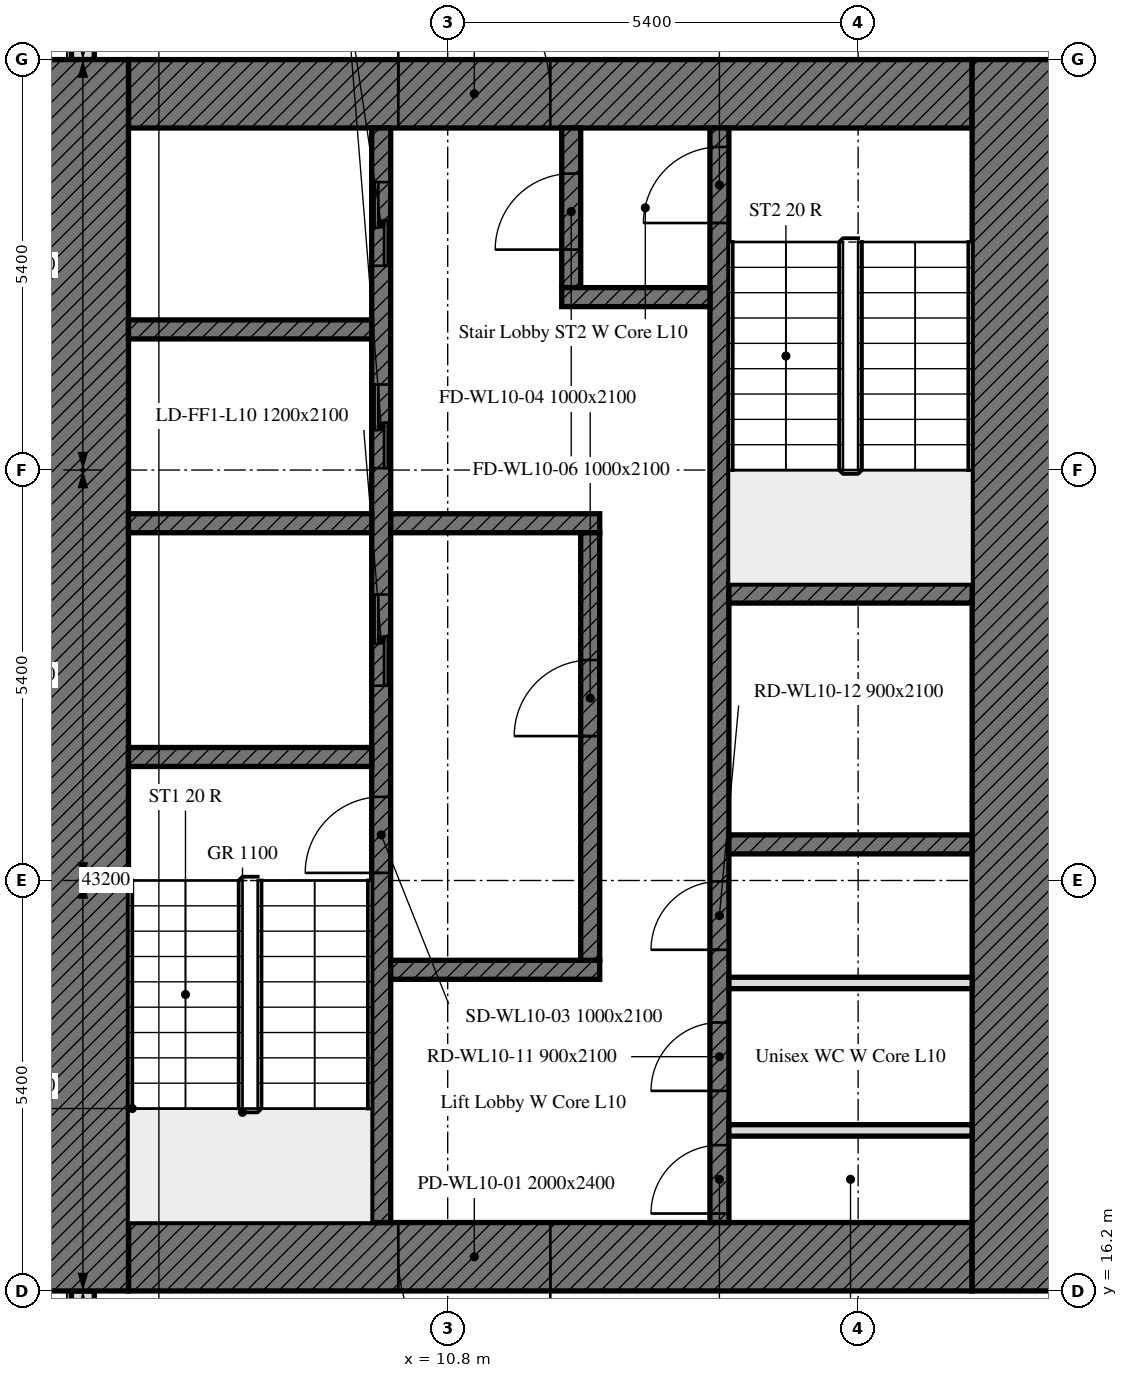
"""IFC4 building model, lengths in metres.
Left out: names, types, materials, properties, quantities, classifications, styles, units other than length and angle.
Written with IfcOpenShell. Run it as: python <this file> out.ifc"""

import sys

from ifc_helpers import new_model, si_unit, direction, frame, frame_2d, origin, place, context, subcontext, project, spatial, rectangle, extrude, element, fill, save


model = new_model("IFC4")
c1 = context("Model", 3, precision=1e-05, world=origin(), true_north=direction((0.0, 1.0)))
c2 = subcontext(c1, "Body", "Model", "MODEL_VIEW")
j1 = project(units=[si_unit("LENGTHUNIT", "METRE"), si_unit("PLANEANGLEUNIT", "RADIAN")], contexts=[c1])
p1 = place(None, origin())
s1 = spatial("IfcSite", under=j1, at=p1, CompositionType="ELEMENT")
p2 = place(p1, origin())
s2 = spatial("IfcBuilding", under=s1, at=p2, CompositionType="ELEMENT")
p3 = place(p2, frame((0.0, 0.0, 48.8)))
s3 = spatial("IfcBuildingStorey", under=s2, at=p3, CompositionType="ELEMENT", Elevation=48.8)
p4 = place(p3, frame((6.0, 37.614, 0.0), z_axis=(0.0, 0.0, 1.0), x_axis=(0.0, -1.0, 0.0)))
e1 = element("IfcWall", 1, at=p4, inside=s3, PredefinedType="SOLIDWALL", context=c2, shape_type="SweptSolid", body=[
    extrude(rectangle(XDim=5.214, YDim=0.3, at=frame_2d((2.607, 0.0))), origin(), (0.0, 0.0, 1.0), 3.5),
])
p5 = place(p4, frame((1.164, 0.0, 0.9)))
e2 = element("IfcOpeningElement", 2, at=p5, cuts=e1, PredefinedType="OPENING", context=c2, shape_type="SweptSolid", body=[
    extrude(rectangle(XDim=1.1, YDim=1.7, at=frame_2d((0.55, 0.85))), frame((0.0, 0.16, 0.0), z_axis=(0.0, -1.0, 0.0), x_axis=(1.0, 0.0, 0.0)), (0.0, 0.0, 1.0), 0.32),
])
p6 = place(p4, frame((2.764, 0.0, 0.9)))
e3 = element("IfcOpeningElement", 3, at=p6, cuts=e1, PredefinedType="OPENING", context=c2, shape_type="SweptSolid", body=[
    extrude(rectangle(XDim=1.1, YDim=1.7, at=frame_2d((0.55, 0.85))), frame((0.0, 0.16, 0.0), z_axis=(0.0, -1.0, 0.0), x_axis=(1.0, 0.0, 0.0)), (0.0, 0.0, 1.0), 0.32),
])
p7 = place(p3, frame((6.0, 16.2, 0.0), z_axis=(0.0, 0.0, 1.0), x_axis=(0.0, -1.0, 0.0)))
e4 = element("IfcWall", 4, at=p7, inside=s3, PredefinedType="SOLIDWALL", context=c2, shape_type="SweptSolid", body=[
    extrude(rectangle(XDim=10.614, YDim=0.3, at=frame_2d((5.307, 0.0))), origin(), (0.0, 0.0, 1.0), 3.5),
])
p8 = place(p7, frame((1.35, 0.0, 0.9)))
e5 = element("IfcOpeningElement", 5, at=p8, cuts=e4, PredefinedType="OPENING", context=c2, shape_type="SweptSolid", body=[
    extrude(rectangle(XDim=1.1, YDim=1.7, at=frame_2d((0.55, 0.85))), frame((0.0, 0.16, 0.0), z_axis=(0.0, -1.0, 0.0), x_axis=(1.0, 0.0, 0.0)), (0.0, 0.0, 1.0), 0.32),
])
p9 = place(p7, frame((2.95, 0.0, 0.9)))
e6 = element("IfcOpeningElement", 6, at=p9, cuts=e4, PredefinedType="OPENING", context=c2, shape_type="SweptSolid", body=[
    extrude(rectangle(XDim=1.1, YDim=1.7, at=frame_2d((0.55, 0.85))), frame((0.0, 0.16, 0.0), z_axis=(0.0, -1.0, 0.0), x_axis=(1.0, 0.0, 0.0)), (0.0, 0.0, 1.0), 0.32),
])
p10 = place(p3, frame((17.7, 16.65, 0.0), z_axis=(0.0, 0.0, 1.0), x_axis=(-1.0, 0.0, 0.0)))
e7 = element("IfcWall", 7, at=p10, inside=s3, PredefinedType="SOLIDWALL", context=c2, shape_type="SweptSolid", body=[
    extrude(rectangle(XDim=11.1, YDim=0.9, at=frame_2d((5.55, 0.0))), origin(), (0.0, 0.0, 1.0), 3.5),
])
p11 = place(p10, frame((5.55, 0.0, 0.0)))
e8 = element("IfcOpeningElement", 8, at=p11, cuts=e7, PredefinedType="OPENING", context=c2, shape_type="SweptSolid", body=[
    extrude(rectangle(XDim=2.0, YDim=2.4, at=frame_2d((1.0, 1.2))), frame((0.0, 0.45, 0.0), z_axis=(0.0, -1.0, 0.0), x_axis=(1.0, 0.0, 0.0)), (0.0, 0.0, 1.0), 0.9),
])
p12 = place(p3, frame((6.6, 31.95, 0.0), z_axis=(0.0, 0.0, 1.0), x_axis=(1.0, 0.0, 0.0)))
e9 = element("IfcWall", 9, at=p12, inside=s3, PredefinedType="SOLIDWALL", context=c2, shape_type="SweptSolid", body=[
    extrude(rectangle(XDim=11.1, YDim=0.9, at=frame_2d((5.55, 0.0))), origin(), (0.0, 0.0, 1.0), 3.5),
])
p13 = place(p12, frame((3.55, 0.0, 0.0)))
e10 = element("IfcOpeningElement", 10, at=p13, cuts=e9, PredefinedType="OPENING", context=c2, shape_type="SweptSolid", body=[
    extrude(rectangle(XDim=2.0, YDim=2.4, at=frame_2d((1.0, 1.2))), frame((0.0, 0.45, 0.0), z_axis=(0.0, -1.0, 0.0), x_axis=(1.0, 0.0, 0.0)), (0.0, 0.0, 1.0), 0.9),
])
for number, where, z_axis, x_axis in (
    (11, (6.0, 16.2, 0.0), (0.0, 0.0, 1.0), (0.0, 1.0, 0.0)),
    (12, (18.3, 32.4, 0.0), (0.0, 0.0, 1.0), (0.0, -1.0, 0.0)),
):
    element("IfcWall", number, at=place(p3, frame(where, z_axis=z_axis, x_axis=x_axis)), inside=s3, PredefinedType="SOLIDWALL", context=c2, shape_type="SweptSolid", body=[
        extrude(rectangle(XDim=16.2, YDim=1.2, at=frame_2d((8.1, 0.0))), origin(), (0.0, 0.0, 1.0), 3.5),
    ])
p14 = place(p3, frame((9.925, 17.1, 0.0), z_axis=(0.0, 0.0, 1.0), x_axis=(0.0, 1.0, 0.0)))
e13 = element("IfcWall", 13, at=p14, inside=s3, PredefinedType="SOLIDWALL", context=c2, shape_type="SweptSolid", body=[
    extrude(rectangle(XDim=14.4, YDim=0.25, at=frame_2d((7.2, 0.0))), origin(), (0.0, 0.0, 1.0), 3.5),
])
p15 = place(p14, frame((4.6, 0.0, 0.0)))
e14 = element("IfcOpeningElement", 14, at=p15, cuts=e13, PredefinedType="OPENING", context=c2, shape_type="SweptSolid", body=[
    extrude(rectangle(XDim=1.0, YDim=2.1, at=frame_2d((0.5, 1.05))), frame((0.0, 0.125, 0.0), z_axis=(0.0, -1.0, 0.0), x_axis=(1.0, 0.0, 0.0)), (0.0, 0.0, 1.0), 0.25),
])
p16 = place(p14, frame((7.062, 0.0, 0.0)))
e15 = element("IfcOpeningElement", 15, at=p16, cuts=e13, PredefinedType="OPENING", context=c2, shape_type="SweptSolid", body=[
    extrude(rectangle(XDim=1.2, YDim=2.1, at=frame_2d((0.6, 1.05))), frame((0.0, 0.125, 0.0), z_axis=(0.0, -1.0, 0.0), x_axis=(1.0, 0.0, 0.0)), (0.0, 0.0, 1.0), 0.25),
])
p17 = place(p14, frame((9.925, 0.0, 0.0)))
e16 = element("IfcOpeningElement", 16, at=p17, cuts=e13, PredefinedType="OPENING", context=c2, shape_type="SweptSolid", body=[
    extrude(rectangle(XDim=1.1, YDim=2.1, at=frame_2d((0.55, 1.05))), frame((0.0, 0.125, 0.0), z_axis=(0.0, -1.0, 0.0), x_axis=(1.0, 0.0, 0.0)), (0.0, 0.0, 1.0), 0.25),
])
p18 = place(p14, frame((12.587, 0.0, 0.0)))
e17 = element("IfcOpeningElement", 17, at=p18, cuts=e13, PredefinedType="OPENING", context=c2, shape_type="SweptSolid", body=[
    extrude(rectangle(XDim=1.1, YDim=2.1, at=frame_2d((0.55, 1.05))), frame((0.0, 0.125, 0.0), z_axis=(0.0, -1.0, 0.0), x_axis=(1.0, 0.0, 0.0)), (0.0, 0.0, 1.0), 0.25),
])
p19 = place(p3, frame((14.375, 17.1, 0.0), z_axis=(0.0, 0.0, 1.0), x_axis=(0.0, 1.0, 0.0)))
e18 = element("IfcWall", 18, at=p19, inside=s3, PredefinedType="SOLIDWALL", context=c2, shape_type="SweptSolid", body=[
    extrude(rectangle(XDim=14.4, YDim=0.25, at=frame_2d((7.2, 0.0))), origin(), (0.0, 0.0, 1.0), 3.5),
])
p20 = place(p19, frame((13.15, 0.0, 0.0)))
e19 = element("IfcOpeningElement", 19, at=p20, cuts=e18, PredefinedType="OPENING", context=c2, shape_type="SweptSolid", body=[
    extrude(rectangle(XDim=1.0, YDim=2.1, at=frame_2d((0.5, 1.05))), frame((0.0, 0.125, 0.0), z_axis=(0.0, -1.0, 0.0), x_axis=(1.0, 0.0, 0.0)), (0.0, 0.0, 1.0), 0.25),
])
p21 = place(p19, frame((0.118, 0.0, 0.0)))
e20 = element("IfcOpeningElement", 20, at=p21, cuts=e18, PredefinedType="OPENING", context=c2, shape_type="SweptSolid", body=[
    extrude(rectangle(XDim=0.9, YDim=2.1, at=frame_2d((0.45, 1.05))), frame((0.0, 0.125, 0.0), z_axis=(0.0, -1.0, 0.0), x_axis=(1.0, 0.0, 0.0)), (0.0, 0.0, 1.0), 0.25),
])
p22 = place(p19, frame((1.732, 0.0, 0.0)))
e21 = element("IfcOpeningElement", 21, at=p22, cuts=e18, PredefinedType="OPENING", context=c2, shape_type="SweptSolid", body=[
    extrude(rectangle(XDim=0.9, YDim=2.1, at=frame_2d((0.45, 1.05))), frame((0.0, 0.125, 0.0), z_axis=(0.0, -1.0, 0.0), x_axis=(1.0, 0.0, 0.0)), (0.0, 0.0, 1.0), 0.25),
])
p23 = place(p19, frame((3.588, 0.0, 0.0)))
e22 = element("IfcOpeningElement", 22, at=p23, cuts=e18, PredefinedType="OPENING", context=c2, shape_type="SweptSolid", body=[
    extrude(rectangle(XDim=0.9, YDim=2.1, at=frame_2d((0.45, 1.05))), frame((0.0, 0.125, 0.0), z_axis=(0.0, -1.0, 0.0), x_axis=(1.0, 0.0, 0.0)), (0.0, 0.0, 1.0), 0.25),
])
for number, where, z_axis, x_axis in (
    (23, (6.6, 23.225, 0.0), (0.0, 0.0, 1.0), (1.0, 0.0, 0.0)),
    (24, (14.5, 25.375, 0.0), (0.0, 0.0, 1.0), (1.0, 0.0, 0.0)),
    (25, (14.5, 22.075, 0.0), (0.0, 0.0, 1.0), (1.0, 0.0, 0.0)),
    (26, (6.6, 26.3, 0.0), (0.0, 0.0, 1.0), (1.0, 0.0, 0.0)),
):
    element("IfcWall", number, at=place(p3, frame(where, z_axis=z_axis, x_axis=x_axis)), inside=s3, PredefinedType="SOLIDWALL", context=c2, shape_type="SweptSolid", body=[
        extrude(rectangle(XDim=3.2, YDim=0.25, at=frame_2d((1.6, 0.0))), origin(), (0.0, 0.0, 1.0), 3.5),
    ])
for number, where, z_axis, x_axis in (
    (27, (10.05, 26.3, 0.0), (0.0, 0.0, 1.0), (1.0, 0.0, 0.0)),
    (28, (10.05, 20.425, 0.0), (0.0, 0.0, 1.0), (1.0, 0.0, 0.0)),
):
    element("IfcWall", number, at=place(p3, frame(where, z_axis=z_axis, x_axis=x_axis)), inside=s3, PredefinedType="SOLIDWALL", context=c2, shape_type="SweptSolid", body=[
        extrude(rectangle(XDim=2.75, YDim=0.25, at=frame_2d((1.375, 0.0))), origin(), (0.0, 0.0, 1.0), 3.5),
    ])
p24 = place(p3, frame((12.425, 29.4, 0.0), z_axis=(0.0, 0.0, 1.0), x_axis=(0.0, 1.0, 0.0)))
e29 = element("IfcWall", 29, at=p24, inside=s3, PredefinedType="SOLIDWALL", context=c2, shape_type="SweptSolid", body=[
    extrude(rectangle(XDim=2.1, YDim=0.25, at=frame_2d((1.05, 0.0))), origin(), (0.0, 0.0, 1.0), 3.5),
])
p25 = place(p24, frame((0.5, 0.0, 0.0)))
e30 = element("IfcOpeningElement", 30, at=p25, cuts=e29, PredefinedType="OPENING", context=c2, shape_type="SweptSolid", body=[
    extrude(rectangle(XDim=1.0, YDim=2.1, at=frame_2d((0.5, 1.05))), frame((0.0, 0.125, 0.0), z_axis=(0.0, -1.0, 0.0), x_axis=(1.0, 0.0, 0.0)), (0.0, 0.0, 1.0), 0.25),
])
p26 = place(p3, frame((12.3, 29.275, 0.0), z_axis=(0.0, 0.0, 1.0), x_axis=(1.0, 0.0, 0.0)))
e31 = element("IfcWall", 31, at=p26, inside=s3, PredefinedType="SOLIDWALL", context=c2, shape_type="SweptSolid", body=[
    extrude(rectangle(XDim=1.95, YDim=0.25, at=frame_2d((0.975, 0.0))), origin(), (0.0, 0.0, 1.0), 3.5),
])
p27 = place(p3, frame((12.675, 20.55, 0.0), z_axis=(0.0, 0.0, 1.0), x_axis=(0.0, 1.0, 0.0)))
e32 = element("IfcWall", 32, at=p27, inside=s3, PredefinedType="SOLIDWALL", context=c2, shape_type="SweptSolid", body=[
    extrude(rectangle(XDim=5.625, YDim=0.25, at=frame_2d((2.812, 0.0))), origin(), (0.0, 0.0, 1.0), 3.5),
])
p28 = place(p27, frame((2.95, 0.0, 0.0)))
e33 = element("IfcOpeningElement", 33, at=p28, cuts=e32, PredefinedType="OPENING", context=c2, shape_type="SweptSolid", body=[
    extrude(rectangle(XDim=1.0, YDim=2.1, at=frame_2d((0.5, 1.05))), frame((0.0, 0.125, 0.0), z_axis=(0.0, -1.0, 0.0), x_axis=(1.0, 0.0, 0.0)), (0.0, 0.0, 1.0), 0.25),
])
p29 = place(p3, frame((6.6, 28.85, 0.0), z_axis=(0.0, 0.0, 1.0), x_axis=(1.0, 0.0, 0.0)))
e34 = element("IfcWall", 34, at=p29, inside=s3, PredefinedType="SOLIDWALL", context=c2, shape_type="SweptSolid", body=[
    extrude(rectangle(XDim=3.2, YDim=0.25, at=frame_2d((1.6, 0.0))), origin(), (0.0, 0.0, 1.0), 3.5),
])
for number, where, z_axis, x_axis in (
    (35, (14.5, 18.312, 0.0), (0.0, 0.0, 1.0), (1.0, 0.0, 0.0)),
    (36, (14.5, 20.252, 0.0), (0.0, 0.0, 1.0), (1.0, 0.0, 0.0)),
):
    element("IfcWall", number, at=place(p3, frame(where, z_axis=z_axis, x_axis=x_axis)), inside=s3, PredefinedType="PARTITIONING", context=c2, shape_type="SweptSolid", body=[
        extrude(rectangle(XDim=3.2, YDim=0.15, at=frame_2d((1.6, 0.0))), origin(), (0.0, 0.0, 1.0), 3.5),
    ])
p30 = place(p11, origin())
e37 = element("IfcDoor", 37, at=p30, inside=s3, OperationType="DOUBLE_DOOR_SINGLE_SWING", PredefinedType="DOOR", context=c2, shape_type="SweptSolid", body=[
    extrude(rectangle(XDim=2.0, YDim=2.4, at=frame_2d((1.0, 1.2))), frame((0.0, 0.025, 0.0), z_axis=(0.0, -1.0, 0.0), x_axis=(1.0, 0.0, 0.0)), (0.0, 0.0, 1.0), 0.05),
])
fill(e8, e37)
p31 = place(p13, origin())
e38 = element("IfcDoor", 38, at=p31, inside=s3, OperationType="DOUBLE_DOOR_SINGLE_SWING", PredefinedType="DOOR", context=c2, shape_type="SweptSolid", body=[
    extrude(rectangle(XDim=2.0, YDim=2.4, at=frame_2d((1.0, 1.2))), frame((0.0, 0.025, 0.0), z_axis=(0.0, -1.0, 0.0), x_axis=(1.0, 0.0, 0.0)), (0.0, 0.0, 1.0), 0.05),
])
fill(e10, e38)
p32 = place(p15, origin())
e39 = element("IfcDoor", 39, at=p32, inside=s3, OperationType="SINGLE_SWING_LEFT", PredefinedType="DOOR", context=c2, shape_type="SweptSolid", body=[
    extrude(rectangle(XDim=1.0, YDim=2.1, at=frame_2d((0.5, 1.05))), frame((0.0, 0.025, 0.0), z_axis=(0.0, -1.0, 0.0), x_axis=(1.0, 0.0, 0.0)), (0.0, 0.0, 1.0), 0.05),
])
fill(e14, e39)
p33 = place(p28, origin())
e40 = element("IfcDoor", 40, at=p33, inside=s3, OperationType="SINGLE_SWING_LEFT", PredefinedType="DOOR", context=c2, shape_type="SweptSolid", body=[
    extrude(rectangle(XDim=1.0, YDim=2.1, at=frame_2d((0.5, 1.05))), frame((0.0, 0.025, 0.0), z_axis=(0.0, -1.0, 0.0), x_axis=(1.0, 0.0, 0.0)), (0.0, 0.0, 1.0), 0.05),
])
fill(e33, e40)
p34 = place(p20, origin())
e41 = element("IfcDoor", 41, at=p34, inside=s3, OperationType="SINGLE_SWING_LEFT", PredefinedType="DOOR", context=c2, shape_type="SweptSolid", body=[
    extrude(rectangle(XDim=1.0, YDim=2.1, at=frame_2d((0.5, 1.05))), frame((0.0, 0.025, 0.0), z_axis=(0.0, -1.0, 0.0), x_axis=(1.0, 0.0, 0.0)), (0.0, 0.0, 1.0), 0.05),
])
fill(e19, e41)
p35 = place(p25, origin())
e42 = element("IfcDoor", 42, at=p35, inside=s3, OperationType="SINGLE_SWING_LEFT", PredefinedType="DOOR", context=c2, shape_type="SweptSolid", body=[
    extrude(rectangle(XDim=1.0, YDim=2.1, at=frame_2d((0.5, 1.05))), frame((0.0, 0.025, 0.0), z_axis=(0.0, -1.0, 0.0), x_axis=(1.0, 0.0, 0.0)), (0.0, 0.0, 1.0), 0.05),
])
fill(e30, e42)
p36 = place(p16, origin())
e43 = element("IfcDoor", 43, at=p36, inside=s3, OperationType="DOUBLE_DOOR_SLIDING", PredefinedType="DOOR", context=c2, shape_type="SweptSolid", body=[
    extrude(rectangle(XDim=1.2, YDim=2.1, at=frame_2d((0.6, 1.05))), frame((0.0, 0.025, 0.0), z_axis=(0.0, -1.0, 0.0), x_axis=(1.0, 0.0, 0.0)), (0.0, 0.0, 1.0), 0.05),
])
fill(e15, e43)
p37 = place(p17, origin())
e44 = element("IfcDoor", 44, at=p37, inside=s3, OperationType="DOUBLE_DOOR_SLIDING", PredefinedType="DOOR", context=c2, shape_type="SweptSolid", body=[
    extrude(rectangle(XDim=1.1, YDim=2.1, at=frame_2d((0.55, 1.05))), frame((0.0, 0.025, 0.0), z_axis=(0.0, -1.0, 0.0), x_axis=(1.0, 0.0, 0.0)), (0.0, 0.0, 1.0), 0.05),
])
fill(e16, e44)
p38 = place(p18, origin())
e45 = element("IfcDoor", 45, at=p38, inside=s3, OperationType="DOUBLE_DOOR_SLIDING", PredefinedType="DOOR", context=c2, shape_type="SweptSolid", body=[
    extrude(rectangle(XDim=1.1, YDim=2.1, at=frame_2d((0.55, 1.05))), frame((0.0, 0.025, 0.0), z_axis=(0.0, -1.0, 0.0), x_axis=(1.0, 0.0, 0.0)), (0.0, 0.0, 1.0), 0.05),
])
fill(e17, e45)
p39 = place(p21, origin())
e46 = element("IfcDoor", 46, at=p39, inside=s3, OperationType="SINGLE_SWING_LEFT", PredefinedType="DOOR", context=c2, shape_type="SweptSolid", body=[
    extrude(rectangle(XDim=0.9, YDim=2.1, at=frame_2d((0.45, 1.05))), frame((0.0, 0.025, 0.0), z_axis=(0.0, -1.0, 0.0), x_axis=(1.0, 0.0, 0.0)), (0.0, 0.0, 1.0), 0.05),
])
fill(e20, e46)
p40 = place(p22, origin())
e47 = element("IfcDoor", 47, at=p40, inside=s3, OperationType="SINGLE_SWING_LEFT", PredefinedType="DOOR", context=c2, shape_type="SweptSolid", body=[
    extrude(rectangle(XDim=0.9, YDim=2.1, at=frame_2d((0.45, 1.05))), frame((0.0, 0.025, 0.0), z_axis=(0.0, -1.0, 0.0), x_axis=(1.0, 0.0, 0.0)), (0.0, 0.0, 1.0), 0.05),
])
fill(e21, e47)
p41 = place(p23, origin())
e48 = element("IfcDoor", 48, at=p41, inside=s3, OperationType="SINGLE_SWING_LEFT", PredefinedType="DOOR", context=c2, shape_type="SweptSolid", body=[
    extrude(rectangle(XDim=0.9, YDim=2.1, at=frame_2d((0.45, 1.05))), frame((0.0, 0.025, 0.0), z_axis=(0.0, -1.0, 0.0), x_axis=(1.0, 0.0, 0.0)), (0.0, 0.0, 1.0), 0.05),
])
fill(e22, e48)
save(model, sys.argv[1])
